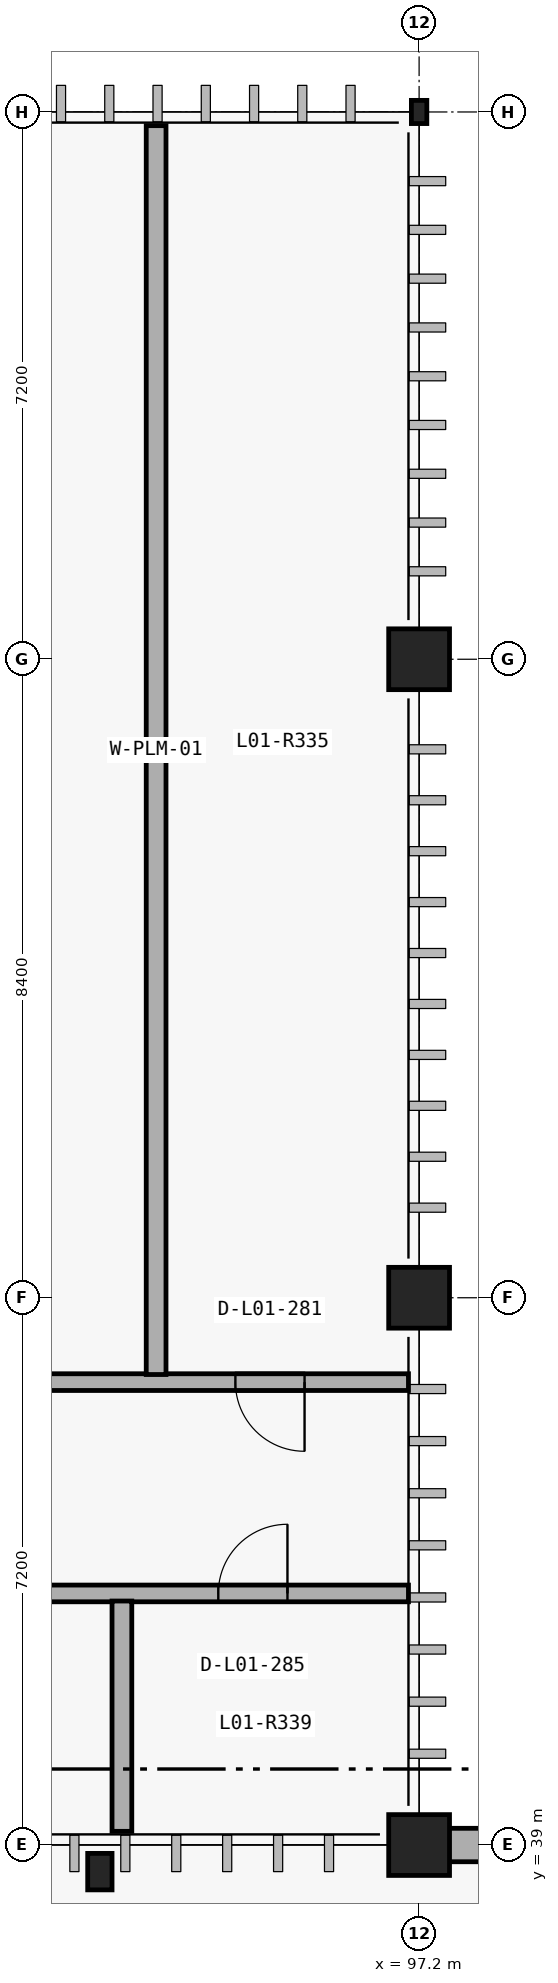
"""IFC4 building model, lengths in metres.
Left out: names, types, materials, properties, quantities, classifications, styles, units other than length and angle.
Written with IfcOpenShell. Run it as: python <this file> out.ifc"""

import sys

from ifc_helpers import new_model, si_unit, direction, frame, frame_2d, origin_with_axes, origin_2d_with_axis, place, context, subcontext, project, spatial, rectangle, hollow_rectangle, circle, extrude, element, fill, save


model = new_model("IFC4")
c1 = context("Model", 3, precision=1e-05, world=origin_with_axes(), true_north=direction((0.0, 1.0)))
c2 = subcontext(c1, "Body", "Model", "MODEL_VIEW")
j1 = project(units=[si_unit("LENGTHUNIT", "METRE"), si_unit("PLANEANGLEUNIT", "RADIAN")], contexts=[c1])
p1 = place(None, origin_with_axes())
s1 = spatial("IfcSite", under=j1, at=p1, CompositionType="ELEMENT")
p2 = place(p1, origin_with_axes())
s2 = spatial("IfcBuilding", under=s1, at=p2, CompositionType="ELEMENT")
p3 = place(p2, frame((0.0, 0.0, 5.4), z_axis=(0.0, 0.0, 1.0), x_axis=(1.0, 0.0, 0.0)))
s3 = spatial("IfcBuildingStorey", under=s2, at=p3, CompositionType="ELEMENT", Elevation=5.4)
p4 = place(None, frame((121.75, 39.0, 5.4), z_axis=(0.0, 0.0, 1.0), x_axis=(-1.0, 0.0, 0.0)))
e1 = element("IfcWall", 1, at=p4, inside=s3, PredefinedType="SOLIDWALL", context=c2, shape_type="SweptSolid", body=[
    extrude(rectangle(XDim=24.5, YDim=0.44, at=frame_2d((12.25, 0.0), x_axis=(1.0, 0.0))), origin_with_axes(), (0.0, 0.0, 1.0), 3.35),
])
p5 = place(None, frame((84.75, 45.09, 5.4), z_axis=(0.0, 0.0, 1.0), x_axis=(1.0, 0.0, 0.0)))
e2 = element("IfcWall", 2, at=p5, inside=s3, PredefinedType="PARTITIONING", context=c2, shape_type="SweptSolid", body=[
    extrude(rectangle(XDim=12.31, YDim=0.22, at=frame_2d((6.155, 0.0), x_axis=(1.0, 0.0))), origin_with_axes(), (0.0, 0.0, 1.0), 5.08),
])
p6 = place(None, frame((95.238, 45.09, 5.4), z_axis=(0.0, 0.0, 1.0), x_axis=(1.0, 0.0, 0.0)))
e3 = element("IfcOpeningElement", 3, at=p6, cuts=e2, PredefinedType="OPENING", context=c2, shape_type="SweptSolid", body=[
    extrude(rectangle(XDim=0.91, YDim=2.12, at=frame_2d((0.0, 1.06), x_axis=(1.0, 0.0))), frame((0.0, 0.12, 0.0), z_axis=(0.0, -1.0, 0.0), x_axis=(1.0, 0.0, 0.0)), (0.0, 0.0, 1.0), 0.24),
])
p7 = place(None, frame((52.95, 42.31, 5.4), z_axis=(0.0, 0.0, 1.0), x_axis=(1.0, 0.0, 0.0)))
e4 = element("IfcWall", 4, at=p7, inside=s3, PredefinedType="PARTITIONING", context=c2, shape_type="SweptSolid", body=[
    extrude(rectangle(XDim=44.11, YDim=0.22, at=frame_2d((22.055, 0.0), x_axis=(1.0, 0.0))), origin_with_axes(), (0.0, 0.0, 1.0), 5.08),
])
p8 = place(None, frame((63.136, 42.31, 5.4), z_axis=(0.0, 0.0, 1.0), x_axis=(1.0, 0.0, 0.0)))
e5 = element("IfcOpeningElement", 5, at=p8, cuts=e4, PredefinedType="OPENING", context=c2, shape_type="SweptSolid", body=[
    extrude(rectangle(XDim=0.92, YDim=2.14, at=frame_2d((0.0, 1.07), x_axis=(1.0, 0.0))), frame((0.0, 0.12, 0.0), z_axis=(0.0, -1.0, 0.0), x_axis=(1.0, 0.0, 0.0)), (0.0, 0.0, 1.0), 0.24),
])
p9 = place(None, frame((83.144, 42.31, 5.4), z_axis=(0.0, 0.0, 1.0), x_axis=(1.0, 0.0, 0.0)))
e6 = element("IfcOpeningElement", 6, at=p9, cuts=e4, PredefinedType="OPENING", context=c2, shape_type="SweptSolid", body=[
    extrude(rectangle(XDim=0.96, YDim=2.2, at=frame_2d((0.0, 1.1), x_axis=(1.0, 0.0))), frame((0.0, 0.12, 0.0), z_axis=(0.0, -1.0, 0.0), x_axis=(1.0, 0.0, 0.0)), (0.0, 0.0, 1.0), 0.24),
])
p10 = place(None, frame((95.013, 42.31, 5.4), z_axis=(0.0, 0.0, 1.0), x_axis=(1.0, 0.0, 0.0)))
e7 = element("IfcOpeningElement", 7, at=p10, cuts=e4, PredefinedType="OPENING", context=c2, shape_type="SweptSolid", body=[
    extrude(rectangle(XDim=0.91, YDim=2.12, at=frame_2d((0.0, 1.06), x_axis=(1.0, 0.0))), frame((0.0, 0.12, 0.0), z_axis=(0.0, -1.0, 0.0), x_axis=(1.0, 0.0, 0.0)), (0.0, 0.0, 1.0), 0.24),
])
p11 = place(None, frame((66.826, 42.31, 6.45), z_axis=(0.0, 0.0, 1.0), x_axis=(1.0, 0.0, 0.0)))
e8 = element("IfcOpeningElement", 8, at=p11, cuts=e4, PredefinedType="OPENING", context=c2, shape_type="SweptSolid", body=[
    extrude(rectangle(XDim=1.9, YDim=1.5, at=frame_2d((0.0, 0.75), x_axis=(1.0, 0.0))), frame((0.0, 0.12, 0.0), z_axis=(0.0, -1.0, 0.0), x_axis=(1.0, 0.0, 0.0)), (0.0, 0.0, 1.0), 0.24),
])
p12 = place(None, frame((93.74, 45.19, 5.4), z_axis=(0.0, 0.0, 1.0), x_axis=(0.0, 1.0, 0.0)))
e9 = element("IfcWall", 9, at=p12, inside=s3, PredefinedType="PLUMBINGWALL", context=c2, shape_type="SweptSolid", body=[
    extrude(rectangle(XDim=16.43, YDim=0.26, at=frame_2d((8.215, 0.0), x_axis=(1.0, 0.0))), origin_with_axes(), (0.0, 0.0, 1.0), 5.08),
])
p13 = place(None, frame((93.29, 39.18, 5.4), z_axis=(0.0, 0.0, 1.0), x_axis=(0.0, 1.0, 0.0)))
e10 = element("IfcWall", 10, at=p13, inside=s3, PredefinedType="PLUMBINGWALL", context=c2, shape_type="SweptSolid", body=[
    extrude(rectangle(XDim=3.03, YDim=0.26, at=frame_2d((1.515, 0.0), x_axis=(1.0, 0.0))), origin_with_axes(), (0.0, 0.0, 1.0), 5.08),
])
for number, where, z_axis, x_axis in (
    (11, (97.2, 39.0, 5.4), (0.0, 0.0, 1.0), (1.0, 0.0, 0.0)),
    (12, (97.2, 46.2, 5.4), (0.0, 0.0, 1.0), (1.0, 0.0, 0.0)),
    (13, (97.2, 54.6, 5.4), (0.0, 0.0, 1.0), (1.0, 0.0, 0.0)),
):
    element("IfcColumn", number, at=place(None, frame(where, z_axis=z_axis, x_axis=x_axis)), inside=s3, PredefinedType="COLUMN", context=c2, shape_type="SweptSolid", body=[
        extrude(circle(Radius=0.4, at=origin_2d_with_axis()), origin_with_axes(), (0.0, 0.0, 1.0), 5.4),
    ])
p14 = place(None, frame((97.2, 61.8, 5.4), z_axis=(0.0, 0.0, 1.0), x_axis=(1.0, 0.0, 0.0)))
e14 = element("IfcColumn", 14, at=p14, inside=s3, PredefinedType="COLUMN", context=c2, shape_type="SweptSolid", body=[
    extrude(hollow_rectangle(XDim=0.203, YDim=0.305, WallThickness=0.013, InnerFilletRadius=0.025, OuterFilletRadius=0.013, at=origin_2d_with_axis()), origin_with_axes(), (0.0, 0.0, 1.0), 5.4),
])
p15 = place(None, frame((95.238, 45.09, 5.4), z_axis=(0.0, 0.0, 1.0), x_axis=(-1.0, 0.0, 0.0)))
e15 = element("IfcDoor", 15, at=p15, inside=s3, OperationType="SINGLE_SWING_RIGHT", PredefinedType="DOOR", context=c2, shape_type="SweptSolid", body=[
    extrude(rectangle(XDim=0.91, YDim=2.12, at=frame_2d((0.0, 1.06), x_axis=(1.0, 0.0))), frame((0.0, 0.04, 0.0), z_axis=(0.0, -1.0, 0.0), x_axis=(1.0, 0.0, 0.0)), (0.0, 0.0, 1.0), 0.08),
])
fill(e3, e15)
p16 = place(None, frame((95.013, 42.31, 5.4), z_axis=(0.0, 0.0, 1.0), x_axis=(1.0, 0.0, 0.0)))
e16 = element("IfcDoor", 16, at=p16, inside=s3, OperationType="SINGLE_SWING_RIGHT", PredefinedType="DOOR", context=c2, shape_type="SweptSolid", body=[
    extrude(rectangle(XDim=0.91, YDim=2.12, at=frame_2d((0.0, 1.06), x_axis=(1.0, 0.0))), frame((0.0, 0.04, 0.0), z_axis=(0.0, -1.0, 0.0), x_axis=(1.0, 0.0, 0.0)), (0.0, 0.0, 1.0), 0.08),
])
fill(e7, e16)
p17 = place(None, frame((93.0, 38.65, 5.4), z_axis=(0.0, 0.0, 1.0), x_axis=(1.0, 0.0, 0.0)))
e17 = element("IfcColumn", 17, at=p17, inside=s3, PredefinedType="PILASTER", context=c2, shape_type="SweptSolid", body=[
    extrude(rectangle(XDim=0.32, YDim=0.48, at=origin_2d_with_axis()), origin_with_axes(), (0.0, 0.0, 1.0), 5.4),
])
save(model, sys.argv[1])
